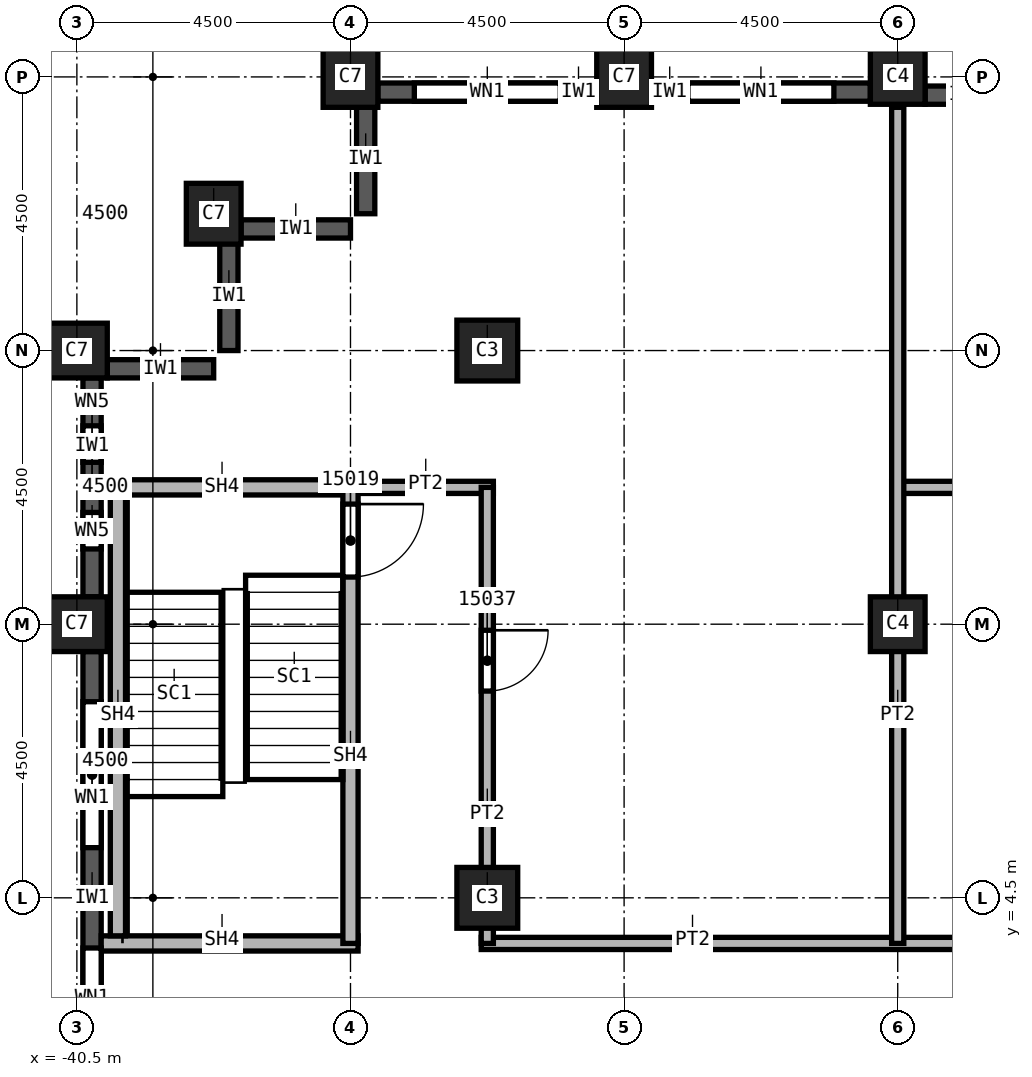
"""IFC4 building model, lengths in metres.
Left out: names, types, materials, properties, quantities, classifications, styles, units other than length and angle.
Written with IfcOpenShell. Run it as: python <this file> out.ifc"""

import sys

from ifc_helpers import new_model, si_unit, direction, frame, frame_2d, origin, origin_2d, place, context, subcontext, project, spatial, rectangle, extrude, element, fill, save


model = new_model("IFC4")
c1 = context("Model", 3, precision=1e-05, world=origin(), true_north=direction((0.0, 1.0)))
c2 = subcontext(c1, "Body", "Model", "MODEL_VIEW")
j1 = project(units=[si_unit("LENGTHUNIT", "METRE"), si_unit("PLANEANGLEUNIT", "RADIAN")], contexts=[c1])
p1 = place(None, origin())
s1 = spatial("IfcSite", under=j1, at=p1, CompositionType="ELEMENT")
p2 = place(p1, origin())
s2 = spatial("IfcBuilding", under=s1, at=p2, CompositionType="ELEMENT")
p3 = place(p2, frame((0.0, 0.0, 232.0)))
s3 = spatial("IfcBuildingStorey", under=s2, at=p3, CompositionType="ELEMENT", Elevation=232.0)
for number, where, z_axis, x_axis in (
    (1, (-40.5, 9.0, 0.0), (0.0, 0.0, 1.0), (0.0, 1.0, 0.0)),
    (2, (-40.5, 13.5, 0.0), (0.0, 0.0, 1.0), (0.0, 1.0, 0.0)),
    (3, (-38.25, 15.75, 0.0), (0.0, 0.0, 1.0), (1.0, 0.0, 0.0)),
    (4, (-31.5, 18.0, 0.0), (0.0, 0.0, 1.0), (1.0, 0.0, 0.0)),
    (5, (-36.0, 18.0, 0.0), (0.0, 0.0, 1.0), (1.0, 0.0, 0.0)),
):
    element("IfcColumn", number, at=place(p3, frame(where, z_axis=z_axis, x_axis=x_axis)), inside=s3, PredefinedType="COLUMN", context=c2, shape_type="SweptSolid", body=[
        extrude(rectangle(XDim=0.9, YDim=1.0, at=origin_2d()), origin(), (0.0, 0.0, 1.0), 3.6),
    ])
for number, where, z_axis, x_axis in (
    (6, (-33.75, 4.5, 0.0), (0.0, 0.0, 1.0), (1.0, 0.0, 0.0)),
    (7, (-33.75, 13.5, 0.0), (0.0, 0.0, 1.0), (1.0, 0.0, 0.0)),
):
    element("IfcColumn", number, at=place(p3, frame(where, z_axis=z_axis, x_axis=x_axis)), inside=s3, PredefinedType="COLUMN", context=c2, shape_type="SweptSolid", body=[
        extrude(rectangle(XDim=1.0, YDim=1.0, at=origin_2d()), origin(), (0.0, 0.0, 1.0), 3.6),
    ])
for number, where, z_axis, x_axis in (
    (8, (-27.0, 9.0, 0.0), (0.0, 0.0, 1.0), (1.0, 0.0, 0.0)),
    (9, (-27.0, 18.0, 0.0), (0.0, 0.0, 1.0), (1.0, 0.0, 0.0)),
):
    element("IfcColumn", number, at=place(p3, frame(where, z_axis=z_axis, x_axis=x_axis)), inside=s3, PredefinedType="COLUMN", context=c2, shape_type="SweptSolid", body=[
        extrude(rectangle(XDim=0.9, YDim=0.9, at=origin_2d()), origin(), (0.0, 0.0, 1.0), 3.6),
    ])
for number, where, z_axis, x_axis in (
    (10, (-35.75, 17.55, 0.0), (0.0, 0.0, 1.0), (0.0, -1.0, 0.0)),
    (11, (-37.8, 15.5, 0.0), (0.0, 0.0, 1.0), (1.0, 0.0, 0.0)),
    (12, (-38.0, 15.3, 0.0), (0.0, 0.0, 1.0), (0.0, -1.0, 0.0)),
):
    element("IfcWall", number, at=place(p3, frame(where, z_axis=z_axis, x_axis=x_axis)), inside=s3, PredefinedType="SOLIDWALL", context=c2, shape_type="SweptSolid", body=[
        extrude(rectangle(XDim=1.8, YDim=0.3, at=frame_2d((0.9, 0.0))), origin(), (0.0, 0.0, 1.0), 3.0),
    ])
p4 = place(p3, frame((-40.0, 13.2, 0.0), z_axis=(0.0, 0.0, 1.0), x_axis=(1.0, 0.0, 0.0)))
e13 = element("IfcWall", 13, at=p4, inside=s3, PredefinedType="SOLIDWALL", context=c2, shape_type="SweptSolid", body=[
    extrude(rectangle(XDim=1.75, YDim=0.3, at=frame_2d((0.875, 0.0))), origin(), (0.0, 0.0, 1.0), 3.0),
])
p5 = place(p3, frame((-25.2, 17.7, 0.0), z_axis=(0.0, 0.0, 1.0), x_axis=(-1.0, 0.0, 0.0)))
e14 = element("IfcWall", 14, at=p5, inside=s3, PredefinedType="SOLIDWALL", context=c2, shape_type="SweptSolid", body=[
    extrude(rectangle(XDim=1.35, YDim=0.3, at=frame_2d((0.675, 0.0))), origin(), (0.0, 0.0, 1.0), 3.0),
])
p6 = place(p3, frame((-27.45, 17.75, 0.0), z_axis=(0.0, 0.0, 1.0), x_axis=(-1.0, 0.0, 0.0)))
e15 = element("IfcWall", 15, at=p6, inside=s3, PredefinedType="SOLIDWALL", context=c2, shape_type="SweptSolid", body=[
    extrude(rectangle(XDim=3.6, YDim=0.3, at=frame_2d((1.8, 0.0))), origin(), (0.0, 0.0, 1.0), 3.0),
])
p7 = place(p6, frame((0.6, 0.0, 0.8)))
e16 = element("IfcOpeningElement", 16, at=p7, cuts=e15, PredefinedType="OPENING", context=c2, shape_type="SweptSolid", body=[
    extrude(rectangle(XDim=2.4, YDim=1.95, at=frame_2d((1.2, 0.975))), frame((0.0, 0.15, 0.0), z_axis=(0.0, -1.0, 0.0), x_axis=(1.0, 0.0, 0.0)), (0.0, 0.0, 1.0), 0.3),
])
p8 = place(p3, frame((-31.95, 17.75, 0.0), z_axis=(0.0, 0.0, 1.0), x_axis=(-1.0, 0.0, 0.0)))
e17 = element("IfcWall", 17, at=p8, inside=s3, PredefinedType="SOLIDWALL", context=c2, shape_type="SweptSolid", body=[
    extrude(rectangle(XDim=3.6, YDim=0.3, at=frame_2d((1.8, 0.0))), origin(), (0.0, 0.0, 1.0), 3.0),
])
p9 = place(p8, frame((0.6, 0.0, 0.8)))
e18 = element("IfcOpeningElement", 18, at=p9, cuts=e17, PredefinedType="OPENING", context=c2, shape_type="SweptSolid", body=[
    extrude(rectangle(XDim=2.4, YDim=1.95, at=frame_2d((1.2, 0.975))), frame((0.0, 0.15, 0.0), z_axis=(0.0, -1.0, 0.0), x_axis=(1.0, 0.0, 0.0)), (0.0, 0.0, 1.0), 0.3),
])
p10 = place(p3, frame((-40.25, 13.05, 0.0), z_axis=(0.0, 0.0, 1.0), x_axis=(0.0, -1.0, 0.0)))
e19 = element("IfcWall", 19, at=p10, inside=s3, PredefinedType="SOLIDWALL", context=c2, shape_type="SweptSolid", body=[
    extrude(rectangle(XDim=3.6, YDim=0.3, at=frame_2d((1.8, 0.0))), origin(), (0.0, 0.0, 1.0), 3.0),
])
p11 = place(p10, frame((0.788, 0.0, 0.8)))
e20 = element("IfcOpeningElement", 20, at=p11, cuts=e19, PredefinedType="OPENING", context=c2, shape_type="SweptSolid", body=[
    extrude(rectangle(XDim=0.6, YDim=1.95, at=frame_2d((0.3, 0.975))), frame((0.0, 0.15, 0.0), z_axis=(0.0, -1.0, 0.0), x_axis=(1.0, 0.0, 0.0)), (0.0, 0.0, 1.0), 0.3),
])
p12 = place(p10, frame((2.212, 0.0, 0.8)))
e21 = element("IfcOpeningElement", 21, at=p12, cuts=e19, PredefinedType="OPENING", context=c2, shape_type="SweptSolid", body=[
    extrude(rectangle(XDim=0.6, YDim=1.95, at=frame_2d((0.3, 0.975))), frame((0.0, 0.15, 0.0), z_axis=(0.0, -1.0, 0.0), x_axis=(1.0, 0.0, 0.0)), (0.0, 0.0, 1.0), 0.3),
])
p13 = place(p3, frame((-40.25, 8.55, 0.0), z_axis=(0.0, 0.0, 1.0), x_axis=(0.0, -1.0, 0.0)))
e22 = element("IfcWall", 22, at=p13, inside=s3, PredefinedType="SOLIDWALL", context=c2, shape_type="SweptSolid", body=[
    extrude(rectangle(XDim=8.1, YDim=0.3, at=frame_2d((4.05, 0.0))), origin(), (0.0, 0.0, 1.0), 3.0),
])
p14 = place(p13, frame((0.825, 0.0, 0.8)))
e23 = element("IfcOpeningElement", 23, at=p14, cuts=e22, PredefinedType="OPENING", context=c2, shape_type="SweptSolid", body=[
    extrude(rectangle(XDim=2.4, YDim=1.95, at=frame_2d((1.2, 0.975))), frame((0.0, 0.15, 0.0), z_axis=(0.0, -1.0, 0.0), x_axis=(1.0, 0.0, 0.0)), (0.0, 0.0, 1.0), 0.3),
])
p15 = place(p13, frame((4.875, 0.0, 0.8)))
e24 = element("IfcOpeningElement", 24, at=p15, cuts=e22, PredefinedType="OPENING", context=c2, shape_type="SweptSolid", body=[
    extrude(rectangle(XDim=2.4, YDim=1.95, at=frame_2d((1.2, 0.975))), frame((0.0, 0.15, 0.0), z_axis=(0.0, -1.0, 0.0), x_axis=(1.0, 0.0, 0.0)), (0.0, 0.0, 1.0), 0.3),
])
p16 = place(p3, frame((-36.0, 11.25, 0.0), z_axis=(0.0, 0.0, 1.0), x_axis=(1.0, 0.0, 0.0)))
e25 = element("IfcWall", 25, at=p16, inside=s3, PredefinedType="PARTITIONING", context=c2, shape_type="SweptSolid", body=[
    extrude(rectangle(XDim=2.35, YDim=0.2, at=frame_2d((1.175, 0.0))), origin(), (0.0, 0.0, 1.0), 3.6),
])
p17 = place(p3, frame((-33.85, 3.75, 0.0), z_axis=(0.0, 0.0, 1.0), x_axis=(1.0, 0.0, 0.0)))
e26 = element("IfcWall", 26, at=p17, inside=s3, PredefinedType="PARTITIONING", context=c2, shape_type="SweptSolid", body=[
    extrude(rectangle(XDim=18.45, YDim=0.2, at=frame_2d((9.225, 0.0))), origin(), (0.0, 0.0, 1.0), 3.6),
])
p18 = place(p17, frame((11.2, 0.0, 0.0)))
e27 = element("IfcOpeningElement", 27, at=p18, cuts=e26, PredefinedType="OPENING", context=c2, shape_type="SweptSolid", body=[
    extrude(rectangle(XDim=1.0, YDim=2.1, at=frame_2d((0.5, 1.05))), frame((0.0, 0.1, 0.0), z_axis=(0.0, -1.0, 0.0), x_axis=(1.0, 0.0, 0.0)), (0.0, 0.0, 1.0), 0.2),
])
p19 = place(p3, frame((-33.75, 11.25, 0.0), z_axis=(0.0, 0.0, 1.0), x_axis=(0.0, -1.0, 0.0)))
e28 = element("IfcWall", 28, at=p19, inside=s3, PredefinedType="PARTITIONING", context=c2, shape_type="SweptSolid", body=[
    extrude(rectangle(XDim=7.5, YDim=0.2, at=frame_2d((3.75, 0.0))), origin(), (0.0, 0.0, 1.0), 3.6),
])
p20 = place(p19, frame((2.35, 0.0, 0.0)))
e29 = element("IfcOpeningElement", 29, at=p20, cuts=e28, PredefinedType="OPENING", context=c2, shape_type="SweptSolid", body=[
    extrude(rectangle(XDim=1.0, YDim=2.1, at=frame_2d((0.5, 1.05))), frame((0.0, 0.1, 0.0), z_axis=(0.0, -1.0, 0.0), x_axis=(1.0, 0.0, 0.0)), (0.0, 0.0, 1.0), 0.2),
])
p21 = place(p3, frame((-27.1, 11.25, 0.0), z_axis=(0.0, 0.0, 1.0), x_axis=(1.0, 0.0, 0.0)))
e30 = element("IfcWall", 30, at=p21, inside=s3, PredefinedType="PARTITIONING", context=c2, shape_type="SweptSolid", body=[
    extrude(rectangle(XDim=6.55, YDim=0.2, at=frame_2d((3.275, 0.0))), origin(), (0.0, 0.0, 1.0), 3.6),
])
p22 = place(p3, frame((-27.0, 3.75, 0.0), z_axis=(0.0, 0.0, 1.0), x_axis=(0.0, 1.0, 0.0)))
e31 = element("IfcWall", 31, at=p22, inside=s3, PredefinedType="PARTITIONING", context=c2, shape_type="SweptSolid", body=[
    extrude(rectangle(XDim=13.75, YDim=0.2, at=frame_2d((6.875, 0.0))), origin(), (0.0, 0.0, 1.0), 3.6),
])
p23 = place(p3, frame((-40.1, 3.75, 0.0), z_axis=(0.0, 0.0, 1.0), x_axis=(1.0, 0.0, 0.0)))
e32 = element("IfcWall", 32, at=p23, inside=s3, PredefinedType="SOLIDWALL", context=c2, shape_type="SweptSolid", body=[
    extrude(rectangle(XDim=4.225, YDim=0.25, at=frame_2d((2.113, 0.0))), origin(), (0.0, 0.0, 1.0), 3.6),
])
p24 = place(p3, frame((-40.1, 11.25, 0.0), z_axis=(0.0, 0.0, 1.0), x_axis=(1.0, 0.0, 0.0)))
e33 = element("IfcWall", 33, at=p24, inside=s3, PredefinedType="SOLIDWALL", context=c2, shape_type="SweptSolid", body=[
    extrude(rectangle(XDim=4.1, YDim=0.25, at=frame_2d((2.05, 0.0))), origin(), (0.0, 0.0, 1.0), 3.6),
])
p25 = place(p3, frame((-36.0, 11.375, 0.0), z_axis=(0.0, 0.0, 1.0), x_axis=(0.0, -1.0, 0.0)))
e34 = element("IfcWall", 34, at=p25, inside=s3, PredefinedType="SOLIDWALL", context=c2, shape_type="SweptSolid", body=[
    extrude(rectangle(XDim=7.625, YDim=0.25, at=frame_2d((3.812, 0.0))), origin(), (0.0, 0.0, 1.0), 3.6),
])
p26 = place(p25, frame((0.4, 0.0, 0.0)))
e35 = element("IfcOpeningElement", 35, at=p26, cuts=e34, PredefinedType="OPENING", context=c2, shape_type="SweptSolid", body=[
    extrude(rectangle(XDim=1.2, YDim=2.1, at=frame_2d((0.6, 1.05))), frame((0.0, 0.125, 0.0), z_axis=(0.0, -1.0, 0.0), x_axis=(1.0, 0.0, 0.0)), (0.0, 0.0, 1.0), 0.25),
])
p27 = place(p3, frame((-39.825, 3.875, 0.0), z_axis=(0.0, 0.0, 1.0), x_axis=(0.0, 1.0, 0.0)))
e36 = element("IfcWall", 36, at=p27, inside=s3, PredefinedType="SOLIDWALL", context=c2, shape_type="SweptSolid", body=[
    extrude(rectangle(XDim=7.25, YDim=0.25, at=frame_2d((3.625, 0.0))), origin(), (0.0, 0.0, 1.0), 3.6),
])
p28 = place(p7, origin())
e37 = element("IfcWindow", 37, at=p28, inside=s3, PartitioningType="SINGLE_PANEL", PredefinedType="WINDOW", context=c2, shape_type="SweptSolid", body=[
    extrude(rectangle(XDim=2.4, YDim=1.95, at=frame_2d((1.2, 0.975))), frame((0.0, 0.03, 0.0), z_axis=(0.0, -1.0, 0.0), x_axis=(1.0, 0.0, 0.0)), (0.0, 0.0, 1.0), 0.06),
])
fill(e16, e37)
p29 = place(p9, origin())
e38 = element("IfcWindow", 38, at=p29, inside=s3, PartitioningType="SINGLE_PANEL", PredefinedType="WINDOW", context=c2, shape_type="SweptSolid", body=[
    extrude(rectangle(XDim=2.4, YDim=1.95, at=frame_2d((1.2, 0.975))), frame((0.0, 0.03, 0.0), z_axis=(0.0, -1.0, 0.0), x_axis=(1.0, 0.0, 0.0)), (0.0, 0.0, 1.0), 0.06),
])
fill(e18, e38)
p30 = place(p14, origin())
e39 = element("IfcWindow", 39, at=p30, inside=s3, PartitioningType="SINGLE_PANEL", PredefinedType="WINDOW", context=c2, shape_type="SweptSolid", body=[
    extrude(rectangle(XDim=2.4, YDim=1.95, at=frame_2d((1.2, 0.975))), frame((0.0, 0.03, 0.0), z_axis=(0.0, -1.0, 0.0), x_axis=(1.0, 0.0, 0.0)), (0.0, 0.0, 1.0), 0.06),
])
fill(e23, e39)
p31 = place(p15, origin())
e40 = element("IfcWindow", 40, at=p31, inside=s3, PartitioningType="SINGLE_PANEL", PredefinedType="WINDOW", context=c2, shape_type="SweptSolid", body=[
    extrude(rectangle(XDim=2.4, YDim=1.95, at=frame_2d((1.2, 0.975))), frame((0.0, 0.03, 0.0), z_axis=(0.0, -1.0, 0.0), x_axis=(1.0, 0.0, 0.0)), (0.0, 0.0, 1.0), 0.06),
])
fill(e24, e40)
p32 = place(p26, origin())
e41 = element("IfcDoor", 41, at=p32, inside=s3, OperationType="SINGLE_SWING_RIGHT", PredefinedType="DOOR", context=c2, shape_type="SweptSolid", body=[
    extrude(rectangle(XDim=1.2, YDim=2.1, at=frame_2d((0.6, 1.05))), frame((0.0, 0.025, 0.0), z_axis=(0.0, -1.0, 0.0), x_axis=(1.0, 0.0, 0.0)), (0.0, 0.0, 1.0), 0.05),
])
fill(e35, e41)
p33 = place(p20, origin())
e42 = element("IfcDoor", 42, at=p33, inside=s3, OperationType="SINGLE_SWING_RIGHT", PredefinedType="DOOR", context=c2, shape_type="SweptSolid", body=[
    extrude(rectangle(XDim=1.0, YDim=2.1, at=frame_2d((0.5, 1.05))), frame((0.0, 0.025, 0.0), z_axis=(0.0, -1.0, 0.0), x_axis=(1.0, 0.0, 0.0)), (0.0, 0.0, 1.0), 0.05),
])
fill(e29, e42)
p34 = place(p11, origin())
e43 = element("IfcWindow", 43, at=p34, inside=s3, PartitioningType="SINGLE_PANEL", PredefinedType="WINDOW", context=c2, shape_type="SweptSolid", body=[
    extrude(rectangle(XDim=0.6, YDim=1.95, at=frame_2d((0.3, 0.975))), frame((0.0, 0.03, 0.0), z_axis=(0.0, -1.0, 0.0), x_axis=(1.0, 0.0, 0.0)), (0.0, 0.0, 1.0), 0.06),
])
fill(e20, e43)
p35 = place(p12, origin())
e44 = element("IfcWindow", 44, at=p35, inside=s3, PartitioningType="SINGLE_PANEL", PredefinedType="WINDOW", context=c2, shape_type="SweptSolid", body=[
    extrude(rectangle(XDim=0.6, YDim=1.95, at=frame_2d((0.3, 0.975))), frame((0.0, 0.03, 0.0), z_axis=(0.0, -1.0, 0.0), x_axis=(1.0, 0.0, 0.0)), (0.0, 0.0, 1.0), 0.06),
])
fill(e21, e44)
save(model, sys.argv[1])
